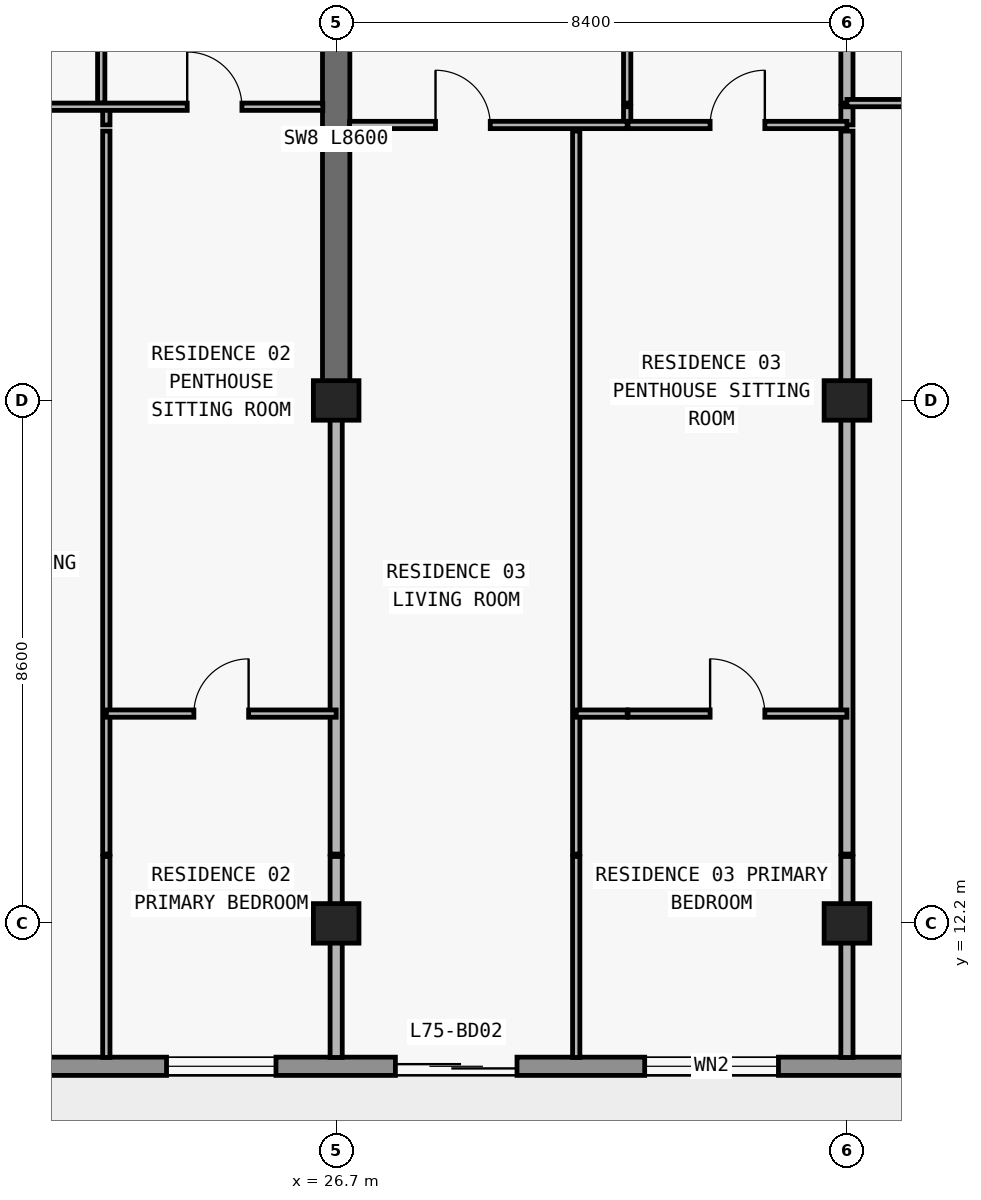
"""IFC4 building model, lengths in metres.
Left out: names, types, materials, properties, quantities, classifications, styles, units other than length and angle.
Written with IfcOpenShell. Run it as: python <this file> out.ifc"""

import sys

from ifc_helpers import new_model, si_unit, direction, frame, frame_2d, origin, origin_2d, place, context, subcontext, project, spatial, rectangle, extrude, element, fill, save


model = new_model("IFC4")
c1 = context("Model", 3, precision=1e-05, world=origin(), true_north=direction((0.0, 1.0)))
c2 = subcontext(c1, "Body", "Model", "MODEL_VIEW")
j1 = project(units=[si_unit("LENGTHUNIT", "METRE"), si_unit("PLANEANGLEUNIT", "RADIAN")], contexts=[c1])
p1 = place(None, origin())
s1 = spatial("IfcSite", under=j1, at=p1, CompositionType="ELEMENT")
p2 = place(p1, origin())
s2 = spatial("IfcBuilding", under=s1, at=p2, CompositionType="ELEMENT")
p3 = place(p2, frame((0.0, 0.0, 266.1)))
s3 = spatial("IfcBuildingStorey", under=s2, at=p3, CompositionType="ELEMENT", Elevation=266.1)
for number, where, z_axis, x_axis in (
    (1, (26.7, 12.2, 0.0), (0.0, 0.0, 1.0), (1.0, 0.0, 0.0)),
    (2, (35.1, 12.2, 0.0), (0.0, 0.0, 1.0), (1.0, 0.0, 0.0)),
    (3, (26.7, 20.8, 0.0), (0.0, 0.0, 1.0), (1.0, 0.0, 0.0)),
    (4, (35.1, 20.8, 0.0), (0.0, 0.0, 1.0), (1.0, 0.0, 0.0)),
):
    element("IfcColumn", number, at=place(p3, frame(where, z_axis=z_axis, x_axis=x_axis)), inside=s3, PredefinedType="COLUMN", context=c2, shape_type="SweptSolid", body=[
        extrude(rectangle(XDim=0.75, YDim=0.65, at=origin_2d()), origin(), (0.0, 0.0, 1.0), 3.0),
    ])
p4 = place(p3, frame((26.7, 20.8, 0.0), z_axis=(0.0, 0.0, 1.0), x_axis=(0.0, 1.0, 0.0)))
e5 = element("IfcWall", 5, at=p4, inside=s3, PredefinedType="SHEAR", context=c2, shape_type="SweptSolid", body=[
    extrude(rectangle(XDim=8.6, YDim=0.45, at=frame_2d((4.3, 0.0))), origin(), (0.0, 0.0, 1.0), 3.0),
])
p5 = place(p3, frame((65.7, 9.85, 0.0), z_axis=(0.0, 0.0, 1.0), x_axis=(-1.0, 0.0, 0.0)))
e6 = element("IfcWall", 6, at=p5, inside=s3, PredefinedType="STANDARD", context=c2, shape_type="SweptSolid", body=[
    extrude(rectangle(XDim=53.6, YDim=0.3, at=frame_2d((26.8, 0.0))), origin(), (0.0, 0.0, 1.0), 3.0),
])
p6 = place(p5, frame((48.05, 0.0, 0.85)))
e7 = element("IfcOpeningElement", 7, at=p6, cuts=e6, PredefinedType="OPENING", context=c2, shape_type="SweptSolid", body=[
    extrude(rectangle(XDim=1.8, YDim=1.55, at=frame_2d((0.9, 0.775))), frame((0.0, 0.16, 0.0), z_axis=(0.0, -1.0, 0.0), x_axis=(1.0, 0.0, 0.0)), (0.0, 0.0, 1.0), 0.32),
])
p7 = place(p5, frame((44.09, 0.0, 0.0)))
e8 = element("IfcOpeningElement", 8, at=p7, cuts=e6, PredefinedType="OPENING", context=c2, shape_type="SweptSolid", body=[
    extrude(rectangle(XDim=2.0, YDim=2.3, at=frame_2d((1.0, 1.15))), frame((0.0, 0.16, 0.0), z_axis=(0.0, -1.0, 0.0), x_axis=(1.0, 0.0, 0.0)), (0.0, 0.0, 1.0), 0.32),
])
p8 = place(p5, frame((39.99, 0.0, 0.85)))
e9 = element("IfcOpeningElement", 9, at=p8, cuts=e6, PredefinedType="OPENING", context=c2, shape_type="SweptSolid", body=[
    extrude(rectangle(XDim=1.8, YDim=1.55, at=frame_2d((0.9, 0.775))), frame((0.0, 0.16, 0.0), z_axis=(0.0, -1.0, 0.0), x_axis=(1.0, 0.0, 0.0)), (0.0, 0.0, 1.0), 0.32),
])
p9 = place(p5, frame((36.026, 0.0, 0.0)))
e10 = element("IfcOpeningElement", 10, at=p9, cuts=e6, PredefinedType="OPENING", context=c2, shape_type="SweptSolid", body=[
    extrude(rectangle(XDim=2.0, YDim=2.3, at=frame_2d((1.0, 1.15))), frame((0.0, 0.16, 0.0), z_axis=(0.0, -1.0, 0.0), x_axis=(1.0, 0.0, 0.0)), (0.0, 0.0, 1.0), 0.32),
])
p10 = place(p5, frame((31.726, 0.0, 0.85)))
e11 = element("IfcOpeningElement", 11, at=p10, cuts=e6, PredefinedType="OPENING", context=c2, shape_type="SweptSolid", body=[
    extrude(rectangle(XDim=2.2, YDim=1.55, at=frame_2d((1.1, 0.775))), frame((0.0, 0.16, 0.0), z_axis=(0.0, -1.0, 0.0), x_axis=(1.0, 0.0, 0.0)), (0.0, 0.0, 1.0), 0.32),
])
p11 = place(p5, frame((27.51, 0.0, 0.0)))
e12 = element("IfcOpeningElement", 12, at=p11, cuts=e6, PredefinedType="OPENING", context=c2, shape_type="SweptSolid", body=[
    extrude(rectangle(XDim=2.0, YDim=2.3, at=frame_2d((1.0, 1.15))), frame((0.0, 0.16, 0.0), z_axis=(0.0, -1.0, 0.0), x_axis=(1.0, 0.0, 0.0)), (0.0, 0.0, 1.0), 0.32),
])
p12 = place(p5, frame((23.81, 0.0, 0.85)))
e13 = element("IfcOpeningElement", 13, at=p12, cuts=e6, PredefinedType="OPENING", context=c2, shape_type="SweptSolid", body=[
    extrude(rectangle(XDim=1.8, YDim=1.55, at=frame_2d((0.9, 0.775))), frame((0.0, 0.16, 0.0), z_axis=(0.0, -1.0, 0.0), x_axis=(1.0, 0.0, 0.0)), (0.0, 0.0, 1.0), 0.32),
])
p13 = place(p5, frame((20.026, 0.0, 0.0)))
e14 = element("IfcOpeningElement", 14, at=p13, cuts=e6, PredefinedType="OPENING", context=c2, shape_type="SweptSolid", body=[
    extrude(rectangle(XDim=2.0, YDim=2.3, at=frame_2d((1.0, 1.15))), frame((0.0, 0.16, 0.0), z_axis=(0.0, -1.0, 0.0), x_axis=(1.0, 0.0, 0.0)), (0.0, 0.0, 1.0), 0.32),
])
p14 = place(p5, frame((15.726, 0.0, 0.85)))
e15 = element("IfcOpeningElement", 15, at=p14, cuts=e6, PredefinedType="OPENING", context=c2, shape_type="SweptSolid", body=[
    extrude(rectangle(XDim=2.2, YDim=1.55, at=frame_2d((1.1, 0.775))), frame((0.0, 0.16, 0.0), z_axis=(0.0, -1.0, 0.0), x_axis=(1.0, 0.0, 0.0)), (0.0, 0.0, 1.0), 0.32),
])
p15 = place(p5, frame((11.69, 0.0, 0.0)))
e16 = element("IfcOpeningElement", 16, at=p15, cuts=e6, PredefinedType="OPENING", context=c2, shape_type="SweptSolid", body=[
    extrude(rectangle(XDim=2.0, YDim=2.3, at=frame_2d((1.0, 1.15))), frame((0.0, 0.16, 0.0), z_axis=(0.0, -1.0, 0.0), x_axis=(1.0, 0.0, 0.0)), (0.0, 0.0, 1.0), 0.32),
])
p16 = place(p5, frame((7.01, 0.0, 0.65)))
e17 = element("IfcOpeningElement", 17, at=p16, cuts=e6, PredefinedType="OPENING", context=c2, shape_type="SweptSolid", body=[
    extrude(rectangle(XDim=2.6, YDim=1.85, at=frame_2d((1.3, 0.925))), frame((0.0, 0.16, 0.0), z_axis=(0.0, -1.0, 0.0), x_axis=(1.0, 0.0, 0.0)), (0.0, 0.0, 1.0), 0.32),
])
p17 = place(p5, frame((2.0, 0.0, 0.85)))
e18 = element("IfcOpeningElement", 18, at=p17, cuts=e6, PredefinedType="OPENING", context=c2, shape_type="SweptSolid", body=[
    extrude(rectangle(XDim=2.2, YDim=1.55, at=frame_2d((1.1, 0.775))), frame((0.0, 0.16, 0.0), z_axis=(0.0, -1.0, 0.0), x_axis=(1.0, 0.0, 0.0)), (0.0, 0.0, 1.0), 0.32),
])
p18 = place(p3, frame((22.836, 25.69, 0.0), z_axis=(0.0, 0.0, 1.0), x_axis=(0.0, 1.0, 0.0)))
e19 = element("IfcWall", 19, at=p18, inside=s3, PredefinedType="PARTITIONING", context=c2, shape_type="SweptSolid", body=[
    extrude(rectangle(XDim=4.69, YDim=0.12, at=frame_2d((2.345, 0.0))), origin(), (0.0, 0.0, 1.0), 3.0),
])
p19 = place(p18, frame((1.895, 0.0, 0.0)))
e20 = element("IfcOpeningElement", 20, at=p19, cuts=e19, PredefinedType="OPENING", context=c2, shape_type="SweptSolid", body=[
    extrude(rectangle(XDim=0.9, YDim=2.15, at=frame_2d((0.45, 1.075))), frame((0.0, 0.07, 0.0), z_axis=(0.0, -1.0, 0.0), x_axis=(1.0, 0.0, 0.0)), (0.0, 0.0, 1.0), 0.14),
])
p20 = place(p3, frame((22.92, 9.995, 0.0), z_axis=(0.0, 0.0, 1.0), x_axis=(0.0, 1.0, 0.0)))
e21 = element("IfcWall", 21, at=p20, inside=s3, PredefinedType="PARTITIONING", context=c2, shape_type="SweptSolid", body=[
    extrude(rectangle(XDim=3.305, YDim=0.12, at=frame_2d((1.652, 0.0))), origin(), (0.0, 0.0, 1.0), 3.0),
])
p21 = place(p3, frame((22.92, 13.34, 0.0), z_axis=(0.0, 0.0, 1.0), x_axis=(0.0, 1.0, 0.0)))
e22 = element("IfcWall", 22, at=p21, inside=s3, PredefinedType="PARTITIONING", context=c2, shape_type="SweptSolid", body=[
    extrude(rectangle(XDim=11.89, YDim=0.12, at=frame_2d((5.945, 0.0))), origin(), (0.0, 0.0, 1.0), 3.0),
])
p22 = place(p3, frame((22.92, 25.33, 0.0), z_axis=(0.0, 0.0, 1.0), x_axis=(0.0, 1.0, 0.0)))
e23 = element("IfcWall", 23, at=p22, inside=s3, PredefinedType="PARTITIONING", context=c2, shape_type="SweptSolid", body=[
    extrude(rectangle(XDim=0.3, YDim=0.12, at=frame_2d((0.15, 0.0))), origin(), (0.0, 0.0, 1.0), 3.0),
])
p23 = place(p3, frame((26.7, 9.995, 0.0), z_axis=(0.0, 0.0, 1.0), x_axis=(0.0, 1.0, 0.0)))
e24 = element("IfcWall", 24, at=p23, inside=s3, PredefinedType="PARTITIONING", context=c2, shape_type="SweptSolid", body=[
    extrude(rectangle(XDim=3.305, YDim=0.2, at=frame_2d((1.652, 0.0))), origin(), (0.0, 0.0, 1.0), 2.213),
])
p24 = place(p3, frame((26.7, 13.34, 0.0), z_axis=(0.0, 0.0, 1.0), x_axis=(0.0, 1.0, 0.0)))
e25 = element("IfcWall", 25, at=p24, inside=s3, PredefinedType="PARTITIONING", context=c2, shape_type="SweptSolid", body=[
    extrude(rectangle(XDim=7.455, YDim=0.2, at=frame_2d((3.728, 0.0))), origin(), (0.0, 0.0, 1.0), 2.213),
])
p25 = place(p3, frame((30.648, 9.995, 0.0), z_axis=(0.0, 0.0, 1.0), x_axis=(0.0, 1.0, 0.0)))
e26 = element("IfcWall", 26, at=p25, inside=s3, PredefinedType="PARTITIONING", context=c2, shape_type="SweptSolid", body=[
    extrude(rectangle(XDim=3.305, YDim=0.12, at=frame_2d((1.652, 0.0))), origin(), (0.0, 0.0, 1.0), 3.0),
])
p26 = place(p3, frame((30.648, 13.34, 0.0), z_axis=(0.0, 0.0, 1.0), x_axis=(0.0, 1.0, 0.0)))
e27 = element("IfcWall", 27, at=p26, inside=s3, PredefinedType="PARTITIONING", context=c2, shape_type="SweptSolid", body=[
    extrude(rectangle(XDim=11.89, YDim=0.12, at=frame_2d((5.945, 0.0))), origin(), (0.0, 0.0, 1.0), 3.0),
])
p27 = place(p3, frame((31.486, 25.33, 0.0), z_axis=(0.0, 0.0, 1.0), x_axis=(0.0, 1.0, 0.0)))
e28 = element("IfcWall", 28, at=p27, inside=s3, PredefinedType="PARTITIONING", context=c2, shape_type="SweptSolid", body=[
    extrude(rectangle(XDim=0.3, YDim=0.12, at=frame_2d((0.15, 0.0))), origin(), (0.0, 0.0, 1.0), 3.0),
])
p28 = place(p3, frame((31.486, 25.69, 0.0), z_axis=(0.0, 0.0, 1.0), x_axis=(0.0, 1.0, 0.0)))
e29 = element("IfcWall", 29, at=p28, inside=s3, PredefinedType="PARTITIONING", context=c2, shape_type="SweptSolid", body=[
    extrude(rectangle(XDim=4.69, YDim=0.12, at=frame_2d((2.345, 0.0))), origin(), (0.0, 0.0, 1.0), 3.0),
])
p29 = place(p28, frame((1.895, 0.0, 0.0)))
e30 = element("IfcOpeningElement", 30, at=p29, cuts=e29, PredefinedType="OPENING", context=c2, shape_type="SweptSolid", body=[
    extrude(rectangle(XDim=0.9, YDim=2.15, at=frame_2d((0.45, 1.075))), frame((0.0, 0.07, 0.0), z_axis=(0.0, -1.0, 0.0), x_axis=(1.0, 0.0, 0.0)), (0.0, 0.0, 1.0), 0.14),
])
p30 = place(p3, frame((35.1, 9.995, 0.0), z_axis=(0.0, 0.0, 1.0), x_axis=(0.0, 1.0, 0.0)))
e31 = element("IfcWall", 31, at=p30, inside=s3, PredefinedType="PARTITIONING", context=c2, shape_type="SweptSolid", body=[
    extrude(rectangle(XDim=3.305, YDim=0.2, at=frame_2d((1.652, 0.0))), origin(), (0.0, 0.0, 1.0), 2.213),
])
p31 = place(p3, frame((35.1, 13.34, 0.0), z_axis=(0.0, 0.0, 1.0), x_axis=(0.0, 1.0, 0.0)))
e32 = element("IfcWall", 32, at=p31, inside=s3, PredefinedType="PARTITIONING", context=c2, shape_type="SweptSolid", body=[
    extrude(rectangle(XDim=11.89, YDim=0.2, at=frame_2d((5.945, 0.0))), origin(), (0.0, 0.0, 1.0), 2.213),
])
p32 = place(p3, frame((35.1, 25.33, 0.0), z_axis=(0.0, 0.0, 1.0), x_axis=(0.0, 1.0, 0.0)))
e33 = element("IfcWall", 33, at=p32, inside=s3, PredefinedType="PARTITIONING", context=c2, shape_type="SweptSolid", body=[
    extrude(rectangle(XDim=0.3, YDim=0.2, at=frame_2d((0.15, 0.0))), origin(), (0.0, 0.0, 1.0), 2.213),
])
p33 = place(p3, frame((35.1, 25.69, 0.0), z_axis=(0.0, 0.0, 1.0), x_axis=(0.0, 1.0, 0.0)))
e34 = element("IfcWall", 34, at=p33, inside=s3, PredefinedType="PARTITIONING", context=c2, shape_type="SweptSolid", body=[
    extrude(rectangle(XDim=4.69, YDim=0.2, at=frame_2d((2.345, 0.0))), origin(), (0.0, 0.0, 1.0), 2.213),
])
p34 = place(p3, frame((22.92, 15.65, 0.0), z_axis=(0.0, 0.0, 1.0), x_axis=(1.0, 0.0, 0.0)))
e35 = element("IfcWall", 35, at=p34, inside=s3, PredefinedType="PARTITIONING", context=c2, shape_type="SweptSolid", body=[
    extrude(rectangle(XDim=3.78, YDim=0.12, at=frame_2d((1.89, 0.0))), origin(), (0.0, 0.0, 1.0), 3.0),
])
p35 = place(p34, frame((1.44, 0.0, 0.0)))
e36 = element("IfcOpeningElement", 36, at=p35, cuts=e35, PredefinedType="OPENING", context=c2, shape_type="SweptSolid", body=[
    extrude(rectangle(XDim=0.9, YDim=2.15, at=frame_2d((0.45, 1.075))), frame((0.0, 0.07, 0.0), z_axis=(0.0, -1.0, 0.0), x_axis=(1.0, 0.0, 0.0)), (0.0, 0.0, 1.0), 0.14),
])
p36 = place(p3, frame((30.648, 15.65, 0.0), z_axis=(0.0, 0.0, 1.0), x_axis=(1.0, 0.0, 0.0)))
e37 = element("IfcWall", 37, at=p36, inside=s3, PredefinedType="PARTITIONING", context=c2, shape_type="SweptSolid", body=[
    extrude(rectangle(XDim=0.838, YDim=0.12, at=frame_2d((0.419, 0.0))), origin(), (0.0, 0.0, 1.0), 3.0),
])
p37 = place(p3, frame((31.5, 15.65, 0.0), z_axis=(0.0, 0.0, 1.0), x_axis=(1.0, 0.0, 0.0)))
e38 = element("IfcWall", 38, at=p37, inside=s3, PredefinedType="PARTITIONING", context=c2, shape_type="SweptSolid", body=[
    extrude(rectangle(XDim=3.6, YDim=0.12, at=frame_2d((1.8, 0.0))), origin(), (0.0, 0.0, 1.0), 3.0),
])
p38 = place(p37, frame((1.35, 0.0, 0.0)))
e39 = element("IfcOpeningElement", 39, at=p38, cuts=e38, PredefinedType="OPENING", context=c2, shape_type="SweptSolid", body=[
    extrude(rectangle(XDim=0.9, YDim=2.15, at=frame_2d((0.45, 1.075))), frame((0.0, 0.07, 0.0), z_axis=(0.0, -1.0, 0.0), x_axis=(1.0, 0.0, 0.0)), (0.0, 0.0, 1.0), 0.14),
])
p39 = place(p3, frame((26.92, 25.33, 0.0), z_axis=(0.0, 0.0, 1.0), x_axis=(1.0, 0.0, 0.0)))
e40 = element("IfcWall", 40, at=p39, inside=s3, PredefinedType="PARTITIONING", context=c2, shape_type="SweptSolid", body=[
    extrude(rectangle(XDim=4.566, YDim=0.12, at=frame_2d((2.283, 0.0))), origin(), (0.0, 0.0, 1.0), 3.0),
])
p40 = place(p39, frame((1.414, 0.0, 0.0)))
e41 = element("IfcOpeningElement", 41, at=p40, cuts=e40, PredefinedType="OPENING", context=c2, shape_type="SweptSolid", body=[
    extrude(rectangle(XDim=0.9, YDim=2.15, at=frame_2d((0.45, 1.075))), frame((0.0, 0.07, 0.0), z_axis=(0.0, -1.0, 0.0), x_axis=(1.0, 0.0, 0.0)), (0.0, 0.0, 1.0), 0.14),
])
p41 = place(p3, frame((31.5, 25.33, 0.0), z_axis=(0.0, 0.0, 1.0), x_axis=(1.0, 0.0, 0.0)))
e42 = element("IfcWall", 42, at=p41, inside=s3, PredefinedType="PARTITIONING", context=c2, shape_type="SweptSolid", body=[
    extrude(rectangle(XDim=3.6, YDim=0.12, at=frame_2d((1.8, 0.0))), origin(), (0.0, 0.0, 1.0), 3.0),
])
p42 = place(p41, frame((1.35, 0.0, 0.0)))
e43 = element("IfcOpeningElement", 43, at=p42, cuts=e42, PredefinedType="OPENING", context=c2, shape_type="SweptSolid", body=[
    extrude(rectangle(XDim=0.9, YDim=2.15, at=frame_2d((0.45, 1.075))), frame((0.0, 0.07, 0.0), z_axis=(0.0, -1.0, 0.0), x_axis=(1.0, 0.0, 0.0)), (0.0, 0.0, 1.0), 0.14),
])
p43 = place(p3, frame((18.3, 25.63, 0.0), z_axis=(0.0, 0.0, 1.0), x_axis=(1.0, 0.0, 0.0)))
e44 = element("IfcWall", 44, at=p43, inside=s3, PredefinedType="PARTITIONING", context=c2, shape_type="SweptSolid", body=[
    extrude(rectangle(XDim=8.18, YDim=0.12, at=frame_2d((4.09, 0.0))), origin(), (0.0, 0.0, 1.0), 3.0),
])
p44 = place(p43, frame((1.818, 0.0, 0.0)))
e45 = element("IfcOpeningElement", 45, at=p44, cuts=e44, PredefinedType="OPENING", context=c2, shape_type="SweptSolid", body=[
    extrude(rectangle(XDim=0.9, YDim=2.15, at=frame_2d((0.45, 1.075))), frame((0.0, 0.07, 0.0), z_axis=(0.0, -1.0, 0.0), x_axis=(1.0, 0.0, 0.0)), (0.0, 0.0, 1.0), 0.14),
])
p45 = place(p43, frame((5.95, 0.0, 0.0)))
e46 = element("IfcOpeningElement", 46, at=p45, cuts=e44, PredefinedType="OPENING", context=c2, shape_type="SweptSolid", body=[
    extrude(rectangle(XDim=0.9, YDim=2.15, at=frame_2d((0.45, 1.075))), frame((0.0, 0.07, 0.0), z_axis=(0.0, -1.0, 0.0), x_axis=(1.0, 0.0, 0.0)), (0.0, 0.0, 1.0), 0.14),
])
p46 = place(p3, frame((35.1, 25.69, 0.0), z_axis=(0.0, 0.0, 1.0), x_axis=(1.0, 0.0, 0.0)))
e47 = element("IfcWall", 47, at=p46, inside=s3, PredefinedType="PARTITIONING", context=c2, shape_type="SweptSolid", body=[
    extrude(rectangle(XDim=7.6, YDim=0.12, at=frame_2d((3.8, 0.0))), origin(), (0.0, 0.0, 1.0), 3.0),
])
p47 = place(p46, frame((1.477, 0.0, 0.0)))
e48 = element("IfcOpeningElement", 48, at=p47, cuts=e47, PredefinedType="OPENING", context=c2, shape_type="SweptSolid", body=[
    extrude(rectangle(XDim=0.9, YDim=2.15, at=frame_2d((0.45, 1.075))), frame((0.0, 0.07, 0.0), z_axis=(0.0, -1.0, 0.0), x_axis=(1.0, 0.0, 0.0)), (0.0, 0.0, 1.0), 0.14),
])
p48 = place(p46, frame((5.44, 0.0, 0.0)))
e49 = element("IfcOpeningElement", 49, at=p48, cuts=e47, PredefinedType="OPENING", context=c2, shape_type="SweptSolid", body=[
    extrude(rectangle(XDim=0.9, YDim=2.15, at=frame_2d((0.45, 1.075))), frame((0.0, 0.07, 0.0), z_axis=(0.0, -1.0, 0.0), x_axis=(1.0, 0.0, 0.0)), (0.0, 0.0, 1.0), 0.14),
])
p49 = place(p8, origin())
e50 = element("IfcWindow", 50, at=p49, inside=s3, PartitioningType="SINGLE_PANEL", PredefinedType="WINDOW", context=c2, shape_type="SweptSolid", body=[
    extrude(rectangle(XDim=1.8, YDim=1.55, at=frame_2d((0.9, 0.775))), frame((0.0, 0.03, 0.0), z_axis=(0.0, -1.0, 0.0), x_axis=(1.0, 0.0, 0.0)), (0.0, 0.0, 1.0), 0.06),
])
fill(e9, e50)
p50 = place(p9, origin())
e51 = element("IfcDoor", 51, at=p50, inside=s3, OperationType="DOUBLE_DOOR_SLIDING", PredefinedType="DOOR", context=c2, shape_type="SweptSolid", body=[
    extrude(rectangle(XDim=2.0, YDim=2.3, at=frame_2d((1.0, 1.15))), frame((0.0, 0.025, 0.0), z_axis=(0.0, -1.0, 0.0), x_axis=(1.0, 0.0, 0.0)), (0.0, 0.0, 1.0), 0.05),
])
fill(e10, e51)
p51 = place(p10, origin())
e52 = element("IfcWindow", 52, at=p51, inside=s3, PartitioningType="SINGLE_PANEL", PredefinedType="WINDOW", context=c2, shape_type="SweptSolid", body=[
    extrude(rectangle(XDim=2.2, YDim=1.55, at=frame_2d((1.1, 0.775))), frame((0.0, 0.03, 0.0), z_axis=(0.0, -1.0, 0.0), x_axis=(1.0, 0.0, 0.0)), (0.0, 0.0, 1.0), 0.06),
])
fill(e11, e52)
p52 = place(p45, origin())
e53 = element("IfcDoor", 53, at=p52, inside=s3, OperationType="SINGLE_SWING_LEFT", PredefinedType="DOOR", context=c2, shape_type="SweptSolid", body=[
    extrude(rectangle(XDim=0.9, YDim=2.15, at=frame_2d((0.45, 1.075))), frame((0.0, 0.025, 0.0), z_axis=(0.0, -1.0, 0.0), x_axis=(1.0, 0.0, 0.0)), (0.0, 0.0, 1.0), 0.05),
])
fill(e46, e53)
p53 = place(p35, origin())
e54 = element("IfcDoor", 54, at=p53, inside=s3, OperationType="SINGLE_SWING_RIGHT", PredefinedType="DOOR", context=c2, shape_type="SweptSolid", body=[
    extrude(rectangle(XDim=0.9, YDim=2.15, at=frame_2d((0.45, 1.075))), frame((0.0, 0.025, 0.0), z_axis=(0.0, -1.0, 0.0), x_axis=(1.0, 0.0, 0.0)), (0.0, 0.0, 1.0), 0.05),
])
fill(e36, e54)
p54 = place(p40, origin())
e55 = element("IfcDoor", 55, at=p54, inside=s3, OperationType="SINGLE_SWING_LEFT", PredefinedType="DOOR", context=c2, shape_type="SweptSolid", body=[
    extrude(rectangle(XDim=0.9, YDim=2.15, at=frame_2d((0.45, 1.075))), frame((0.0, 0.025, 0.0), z_axis=(0.0, -1.0, 0.0), x_axis=(1.0, 0.0, 0.0)), (0.0, 0.0, 1.0), 0.05),
])
fill(e41, e55)
p55 = place(p42, origin())
e56 = element("IfcDoor", 56, at=p55, inside=s3, OperationType="SINGLE_SWING_RIGHT", PredefinedType="DOOR", context=c2, shape_type="SweptSolid", body=[
    extrude(rectangle(XDim=0.9, YDim=2.15, at=frame_2d((0.45, 1.075))), frame((0.0, 0.025, 0.0), z_axis=(0.0, -1.0, 0.0), x_axis=(1.0, 0.0, 0.0)), (0.0, 0.0, 1.0), 0.05),
])
fill(e43, e56)
p56 = place(p38, origin())
e57 = element("IfcDoor", 57, at=p56, inside=s3, OperationType="SINGLE_SWING_LEFT", PredefinedType="DOOR", context=c2, shape_type="SweptSolid", body=[
    extrude(rectangle(XDim=0.9, YDim=2.15, at=frame_2d((0.45, 1.075))), frame((0.0, 0.025, 0.0), z_axis=(0.0, -1.0, 0.0), x_axis=(1.0, 0.0, 0.0)), (0.0, 0.0, 1.0), 0.05),
])
fill(e39, e57)
save(model, sys.argv[1])
